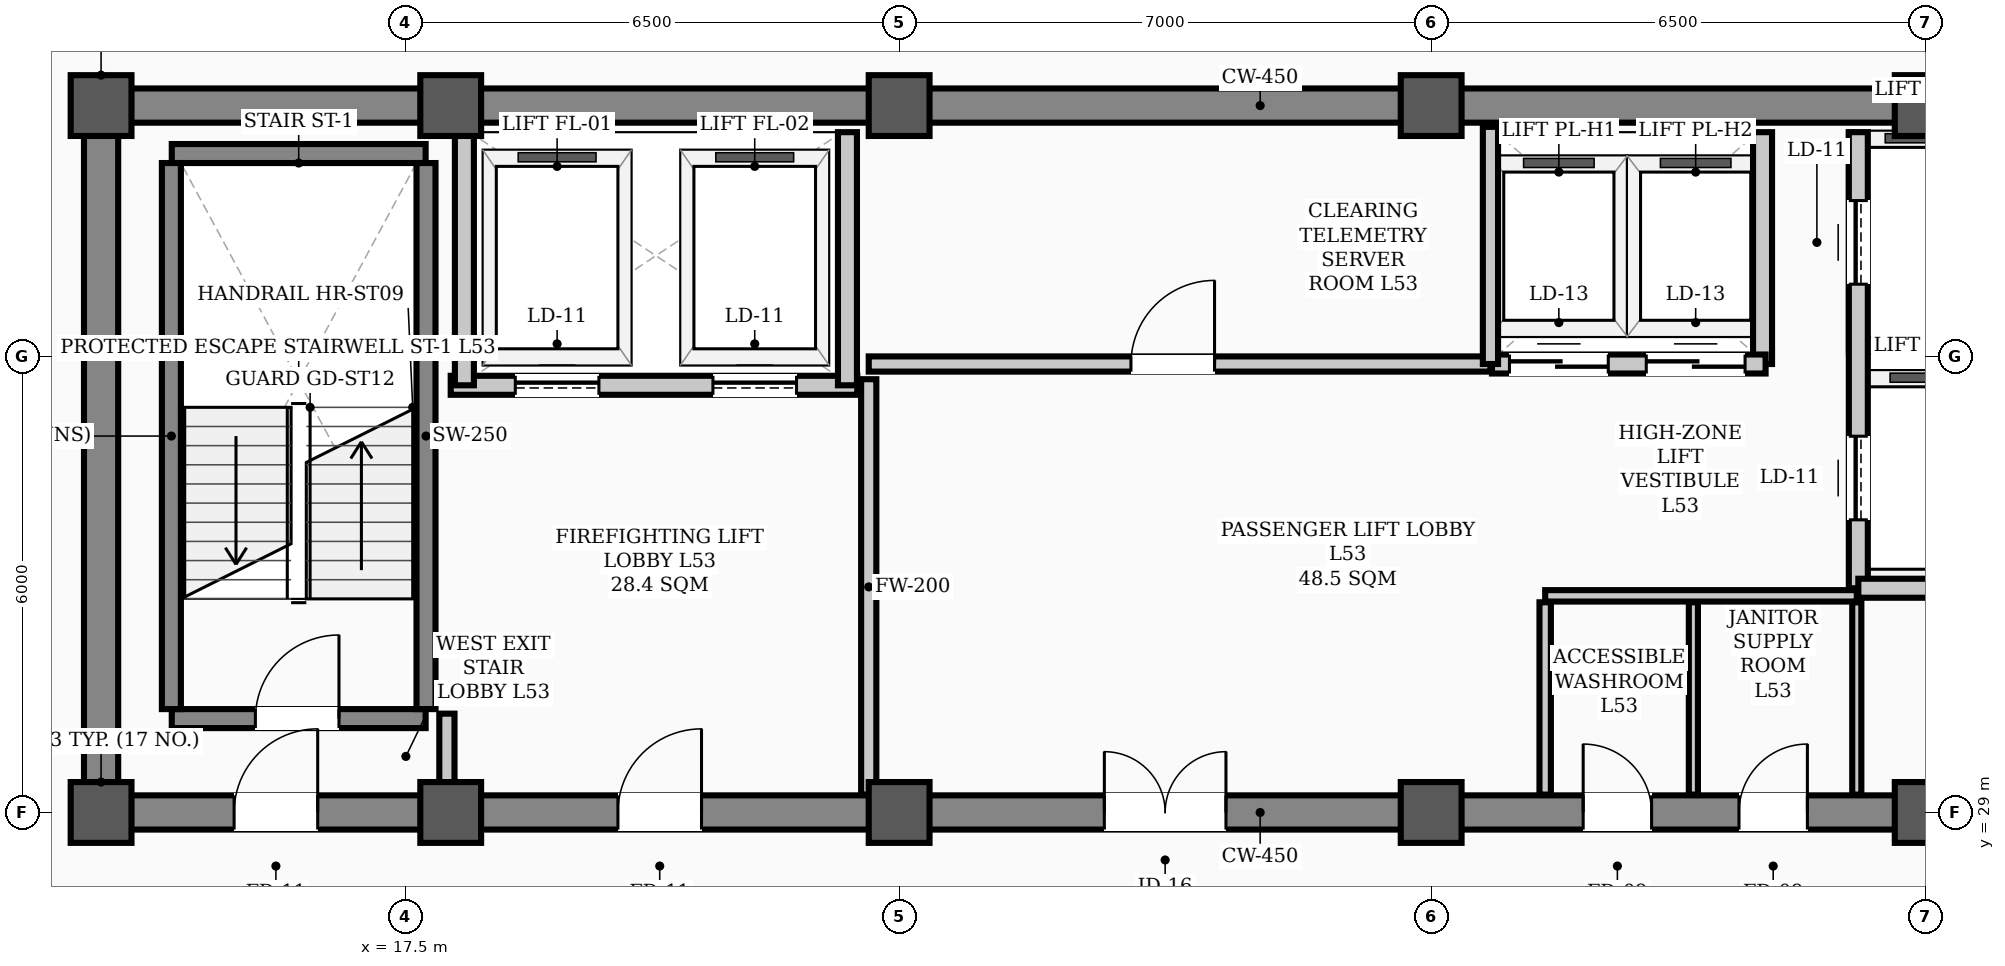
"""IFC4 building model, lengths in metres.
Left out: names, types, materials, properties, quantities, classifications, styles, units other than length and angle.
Written with IfcOpenShell. Run it as: python <this file> out.ifc"""

import sys

from ifc_helpers import new_model, si_unit, direction, frame, frame_2d, origin, origin_2d, place, context, subcontext, project, spatial, rectangle, hollow_rectangle, extrude, element, fill, save


model = new_model("IFC4")
c1 = context("Model", 3, precision=1e-05, world=origin(), true_north=direction((0.0, 1.0)))
c2 = subcontext(c1, "Body", "Model", "MODEL_VIEW")
j1 = project(units=[si_unit("LENGTHUNIT", "METRE"), si_unit("PLANEANGLEUNIT", "RADIAN")], contexts=[c1])
p1 = place(None, origin())
s1 = spatial("IfcSite", under=j1, at=p1, CompositionType="ELEMENT")
p2 = place(p1, origin())
s2 = spatial("IfcBuilding", under=s1, at=p2, CompositionType="ELEMENT")
p3 = place(p2, frame((0.0, 0.0, 215.0)))
s3 = spatial("IfcBuildingStorey", under=s2, at=p3, CompositionType="ELEMENT", Elevation=215.0)
for number, where, z_axis, x_axis in (
    (1, (13.5, 29.0, 0.0), (0.0, 0.0, 1.0), (1.0, 0.0, 0.0)),
    (2, (13.5, 38.3, 0.0), (0.0, 0.0, 1.0), (1.0, 0.0, 0.0)),
    (3, (18.1, 29.0, 0.0), (0.0, 0.0, 1.0), (1.0, 0.0, 0.0)),
    (4, (18.1, 38.3, 0.0), (0.0, 0.0, 1.0), (1.0, 0.0, 0.0)),
    (5, (24.0, 29.0, 0.0), (0.0, 0.0, 1.0), (1.0, 0.0, 0.0)),
    (6, (24.0, 38.3, 0.0), (0.0, 0.0, 1.0), (1.0, 0.0, 0.0)),
    (7, (31.0, 29.0, 0.0), (0.0, 0.0, 1.0), (1.0, 0.0, 0.0)),
    (8, (31.0, 38.3, 0.0), (0.0, 0.0, 1.0), (1.0, 0.0, 0.0)),
    (9, (37.5, 29.0, 0.0), (0.0, 0.0, 1.0), (1.0, 0.0, 0.0)),
    (10, (37.5, 38.3, 0.0), (0.0, 0.0, 1.0), (1.0, 0.0, 0.0)),
):
    element("IfcColumn", number, at=place(p3, frame(where, z_axis=z_axis, x_axis=x_axis)), inside=s3, PredefinedType="COLUMN", context=c2, shape_type="SweptSolid", body=[
        extrude(hollow_rectangle(XDim=0.8, YDim=0.8, WallThickness=0.032, InnerFilletRadius=0.016, OuterFilletRadius=0.048, at=origin_2d()), origin(), (0.0, 0.0, 1.0), 3.9),
    ])
p4 = place(p3, frame((13.5, 29.0, 0.0), z_axis=(0.0, 0.0, 1.0), x_axis=(1.0, 0.0, 0.0)))
e11 = element("IfcWall", 11, at=p4, inside=s3, PredefinedType="SHEAR", context=c2, shape_type="SweptSolid", body=[
    extrude(rectangle(XDim=30.5, YDim=0.45, at=frame_2d((15.25, 0.0))), origin(), (0.0, 0.0, 1.0), 3.72),
])
p5 = place(p4, frame((1.75, 0.0, 0.0)))
e12 = element("IfcOpeningElement", 12, at=p5, cuts=e11, PredefinedType="OPENING", context=c2, shape_type="SweptSolid", body=[
    extrude(rectangle(XDim=1.1, YDim=2.08, at=frame_2d((0.55, 1.04))), frame((0.0, 0.235, 0.0), z_axis=(0.0, -1.0, 0.0), x_axis=(1.0, 0.0, 0.0)), (0.0, 0.0, 1.0), 0.47),
])
p6 = place(p4, frame((26.7, 0.0, 0.0)))
e13 = element("IfcOpeningElement", 13, at=p6, cuts=e11, PredefinedType="OPENING", context=c2, shape_type="SweptSolid", body=[
    extrude(rectangle(XDim=1.1, YDim=2.08, at=frame_2d((0.55, 1.04))), frame((0.0, 0.235, 0.0), z_axis=(0.0, -1.0, 0.0), x_axis=(1.0, 0.0, 0.0)), (0.0, 0.0, 1.0), 0.47),
])
p7 = place(p4, frame((6.8, 0.0, 0.0)))
e14 = element("IfcOpeningElement", 14, at=p7, cuts=e11, PredefinedType="OPENING", context=c2, shape_type="SweptSolid", body=[
    extrude(rectangle(XDim=1.1, YDim=2.08, at=frame_2d((0.55, 1.04))), frame((0.0, 0.235, 0.0), z_axis=(0.0, -1.0, 0.0), x_axis=(1.0, 0.0, 0.0)), (0.0, 0.0, 1.0), 0.47),
])
p8 = place(p4, frame((13.2, 0.0, 0.0)))
e15 = element("IfcOpeningElement", 15, at=p8, cuts=e11, PredefinedType="OPENING", context=c2, shape_type="SweptSolid", body=[
    extrude(rectangle(XDim=1.6, YDim=2.08, at=frame_2d((0.8, 1.04))), frame((0.0, 0.235, 0.0), z_axis=(0.0, -1.0, 0.0), x_axis=(1.0, 0.0, 0.0)), (0.0, 0.0, 1.0), 0.47),
])
p9 = place(p4, frame((19.5, 0.0, 0.0)))
e16 = element("IfcOpeningElement", 16, at=p9, cuts=e11, PredefinedType="OPENING", context=c2, shape_type="SweptSolid", body=[
    extrude(rectangle(XDim=0.9, YDim=2.08, at=frame_2d((0.45, 1.04))), frame((0.0, 0.235, 0.0), z_axis=(0.0, -1.0, 0.0), x_axis=(1.0, 0.0, 0.0)), (0.0, 0.0, 1.0), 0.47),
])
p10 = place(p4, frame((21.55, 0.0, 0.0)))
e17 = element("IfcOpeningElement", 17, at=p10, cuts=e11, PredefinedType="OPENING", context=c2, shape_type="SweptSolid", body=[
    extrude(rectangle(XDim=0.9, YDim=2.08, at=frame_2d((0.45, 1.04))), frame((0.0, 0.235, 0.0), z_axis=(0.0, -1.0, 0.0), x_axis=(1.0, 0.0, 0.0)), (0.0, 0.0, 1.0), 0.47),
])
p11 = place(p3, frame((13.5, 38.3, 0.0), z_axis=(0.0, 0.0, 1.0), x_axis=(1.0, 0.0, 0.0)))
e18 = element("IfcWall", 18, at=p11, inside=s3, PredefinedType="SHEAR", context=c2, shape_type="SweptSolid", body=[
    extrude(rectangle(XDim=30.5, YDim=0.45, at=frame_2d((15.25, 0.0))), origin(), (0.0, 0.0, 1.0), 3.72),
])
p12 = place(p3, frame((13.5, 29.35, 0.0), z_axis=(0.0, 0.0, 1.0), x_axis=(0.0, 1.0, 0.0)))
e19 = element("IfcWall", 19, at=p12, inside=s3, PredefinedType="SHEAR", context=c2, shape_type="SweptSolid", body=[
    extrude(rectangle(XDim=8.6, YDim=0.45, at=frame_2d((4.3, 0.0))), origin(), (0.0, 0.0, 1.0), 3.72),
])
p13 = place(p3, frame((14.43, 30.235, 0.0), z_axis=(0.0, 0.0, 1.0), x_axis=(1.0, 0.0, 0.0)))
e20 = element("IfcWall", 20, at=p13, inside=s3, PredefinedType="STANDARD", context=c2, shape_type="SweptSolid", body=[
    extrude(rectangle(XDim=3.34, YDim=0.25, at=frame_2d((1.67, 0.0))), origin(), (0.0, 0.0, 1.0), 3.72),
])
p14 = place(p13, frame((1.1, 0.0, 0.0)))
e21 = element("IfcOpeningElement", 21, at=p14, cuts=e20, PredefinedType="OPENING", context=c2, shape_type="SweptSolid", body=[
    extrude(rectangle(XDim=1.1, YDim=2.08, at=frame_2d((0.55, 1.04))), frame((0.0, 0.135, 0.0), z_axis=(0.0, -1.0, 0.0), x_axis=(1.0, 0.0, 0.0)), (0.0, 0.0, 1.0), 0.27),
])
p15 = place(p3, frame((14.43, 37.669, 0.0), z_axis=(0.0, 0.0, 1.0), x_axis=(1.0, 0.0, 0.0)))
e22 = element("IfcWall", 22, at=p15, inside=s3, PredefinedType="STANDARD", context=c2, shape_type="SweptSolid", body=[
    extrude(rectangle(XDim=3.34, YDim=0.25, at=frame_2d((1.67, 0.0))), origin(), (0.0, 0.0, 1.0), 3.72),
])
for number, where, z_axis, x_axis in (
    (23, (14.425, 30.36, 0.0), (0.0, 0.0, 1.0), (0.0, 1.0, 0.0)),
    (24, (17.775, 30.36, 0.0), (0.0, 0.0, 1.0), (0.0, 1.0, 0.0)),
):
    element("IfcWall", number, at=place(p3, frame(where, z_axis=z_axis, x_axis=x_axis)), inside=s3, PredefinedType="STANDARD", context=c2, shape_type="SweptSolid", body=[
        extrude(rectangle(XDim=7.184, YDim=0.25, at=frame_2d((3.592, 0.0))), origin(), (0.0, 0.0, 1.0), 3.72),
    ])
p16 = place(p3, frame((18.1, 34.62, 0.0), z_axis=(0.0, 0.0, 1.0), x_axis=(1.0, 0.0, 0.0)))
e25 = element("IfcWall", 25, at=p16, inside=s3, PredefinedType="STANDARD", context=c2, shape_type="SweptSolid", body=[
    extrude(rectangle(XDim=5.35, YDim=0.25, at=frame_2d((2.675, 0.0))), origin(), (0.0, 0.0, 1.0), 3.72),
])
p17 = place(p16, frame((0.85, 0.0, 0.0)))
e26 = element("IfcOpeningElement", 26, at=p17, cuts=e25, PredefinedType="OPENING", context=c2, shape_type="SweptSolid", body=[
    extrude(rectangle(XDim=1.1, YDim=2.08, at=frame_2d((0.55, 1.04))), frame((0.0, 0.135, 0.0), z_axis=(0.0, -1.0, 0.0), x_axis=(1.0, 0.0, 0.0)), (0.0, 0.0, 1.0), 0.27),
])
p18 = place(p16, frame((3.45, 0.0, 0.0)))
e27 = element("IfcOpeningElement", 27, at=p18, cuts=e25, PredefinedType="OPENING", context=c2, shape_type="SweptSolid", body=[
    extrude(rectangle(XDim=1.1, YDim=2.08, at=frame_2d((0.55, 1.04))), frame((0.0, 0.135, 0.0), z_axis=(0.0, -1.0, 0.0), x_axis=(1.0, 0.0, 0.0)), (0.0, 0.0, 1.0), 0.27),
])
p19 = place(p3, frame((36.62, 31.95, 0.0), z_axis=(0.0, 0.0, 1.0), x_axis=(0.0, 1.0, 0.0)))
e28 = element("IfcWall", 28, at=p19, inside=s3, PredefinedType="STANDARD", context=c2, shape_type="SweptSolid", body=[
    extrude(rectangle(XDim=6.0, YDim=0.25, at=frame_2d((3.0, 0.0))), origin(), (0.0, 0.0, 1.0), 3.72),
])
p20 = place(p19, frame((0.9, 0.0, 0.0)))
e29 = element("IfcOpeningElement", 29, at=p20, cuts=e28, PredefinedType="OPENING", context=c2, shape_type="SweptSolid", body=[
    extrude(rectangle(XDim=1.1, YDim=2.08, at=frame_2d((0.55, 1.04))), frame((0.0, 0.135, 0.0), z_axis=(0.0, -1.0, 0.0), x_axis=(1.0, 0.0, 0.0)), (0.0, 0.0, 1.0), 0.27),
])
p21 = place(p19, frame((4.0, 0.0, 0.0)))
e30 = element("IfcOpeningElement", 30, at=p21, cuts=e28, PredefinedType="OPENING", context=c2, shape_type="SweptSolid", body=[
    extrude(rectangle(XDim=1.1, YDim=2.08, at=frame_2d((0.55, 1.04))), frame((0.0, 0.135, 0.0), z_axis=(0.0, -1.0, 0.0), x_axis=(1.0, 0.0, 0.0)), (0.0, 0.0, 1.0), 0.27),
])
p22 = place(p3, frame((36.62, 31.95, 0.0), z_axis=(0.0, 0.0, 1.0), x_axis=(1.0, 0.0, 0.0)))
e31 = element("IfcWall", 31, at=p22, inside=s3, PredefinedType="STANDARD", context=c2, shape_type="SweptSolid", body=[
    extrude(rectangle(XDim=1.9, YDim=0.25, at=frame_2d((0.95, 0.0))), origin(), (0.0, 0.0, 1.0), 3.48),
])
for number, where, z_axis, x_axis in (
    (32, (18.28, 34.62, 0.0), (0.0, 0.0, 1.0), (0.0, 1.0, 0.0)),
    (33, (23.32, 34.62, 0.0), (0.0, 0.0, 1.0), (0.0, 1.0, 0.0)),
):
    element("IfcWall", number, at=place(p3, frame(where, z_axis=z_axis, x_axis=x_axis)), inside=s3, PredefinedType="STANDARD", context=c2, shape_type="SweptSolid", body=[
        extrude(rectangle(XDim=3.33, YDim=0.25, at=frame_2d((1.665, 0.0))), origin(), (0.0, 0.0, 1.0), 3.72),
    ])
p23 = place(p3, frame((35.36, 34.9, 0.0), z_axis=(0.0, 0.0, 1.0), x_axis=(0.0, 1.0, 0.0)))
e34 = element("IfcWall", 34, at=p23, inside=s3, PredefinedType="STANDARD", context=c2, shape_type="SweptSolid", body=[
    extrude(rectangle(XDim=3.05, YDim=0.25, at=frame_2d((1.525, 0.0))), origin(), (0.0, 0.0, 1.0), 3.72),
])
p24 = place(p3, frame((31.8, 34.9, 0.0), z_axis=(0.0, 0.0, 1.0), x_axis=(1.0, 0.0, 0.0)))
e35 = element("IfcWall", 35, at=p24, inside=s3, PredefinedType="STANDARD", context=c2, shape_type="SweptSolid", body=[
    extrude(rectangle(XDim=3.6, YDim=0.25, at=frame_2d((1.8, 0.0))), origin(), (0.0, 0.0, 1.0), 3.72),
])
p25 = place(p24, frame((0.23, 0.0, 0.0)))
e36 = element("IfcOpeningElement", 36, at=p25, cuts=e35, PredefinedType="OPENING", context=c2, shape_type="SweptSolid", body=[
    extrude(rectangle(XDim=1.3, YDim=2.08, at=frame_2d((0.65, 1.04))), frame((0.0, 0.135, 0.0), z_axis=(0.0, -1.0, 0.0), x_axis=(1.0, 0.0, 0.0)), (0.0, 0.0, 1.0), 0.27),
])
p26 = place(p24, frame((2.03, 0.0, 0.0)))
e37 = element("IfcOpeningElement", 37, at=p26, cuts=e35, PredefinedType="OPENING", context=c2, shape_type="SweptSolid", body=[
    extrude(rectangle(XDim=1.3, YDim=2.08, at=frame_2d((0.65, 1.04))), frame((0.0, 0.135, 0.0), z_axis=(0.0, -1.0, 0.0), x_axis=(1.0, 0.0, 0.0)), (0.0, 0.0, 1.0), 0.27),
])
p27 = place(p3, frame((23.6, 34.9, 0.0), z_axis=(0.0, 0.0, 1.0), x_axis=(1.0, 0.0, 0.0)))
e38 = element("IfcWall", 38, at=p27, inside=s3, PredefinedType="STANDARD", context=c2, shape_type="SweptSolid", body=[
    extrude(rectangle(XDim=8.18, YDim=0.2, at=frame_2d((4.09, 0.0))), origin(), (0.0, 0.0, 1.0), 3.72),
])
p28 = place(p27, frame((3.45, 0.0, 0.0)))
e39 = element("IfcOpeningElement", 39, at=p28, cuts=e38, PredefinedType="OPENING", context=c2, shape_type="SweptSolid", body=[
    extrude(rectangle(XDim=1.1, YDim=2.08, at=frame_2d((0.55, 1.04))), frame((0.0, 0.11, 0.0), z_axis=(0.0, -1.0, 0.0), x_axis=(1.0, 0.0, 0.0)), (0.0, 0.0, 1.0), 0.22),
])
p29 = place(p3, frame((32.5, 31.85, 0.0), z_axis=(0.0, 0.0, 1.0), x_axis=(1.0, 0.0, 0.0)))
e40 = element("IfcWall", 40, at=p29, inside=s3, PredefinedType="PARTITIONING", context=c2, shape_type="SweptSolid", body=[
    extrude(rectangle(XDim=4.1, YDim=0.15, at=frame_2d((2.05, 0.0))), origin(), (0.0, 0.0, 1.0), 3.72),
])
p30 = place(p3, frame((18.05, 29.235, 0.0), z_axis=(0.0, 0.0, 1.0), x_axis=(0.0, 1.0, 0.0)))
e41 = element("IfcWall", 41, at=p30, inside=s3, PredefinedType="STANDARD", context=c2, shape_type="SweptSolid", body=[
    extrude(rectangle(XDim=1.065, YDim=0.2, at=frame_2d((0.532, 0.0))), origin(), (0.0, 0.0, 1.0), 3.35),
])
p31 = place(p3, frame((23.6, 29.235, 0.0), z_axis=(0.0, 0.0, 1.0), x_axis=(0.0, 1.0, 0.0)))
e42 = element("IfcWall", 42, at=p31, inside=s3, PredefinedType="STANDARD", context=c2, shape_type="SweptSolid", body=[
    extrude(rectangle(XDim=5.465, YDim=0.2, at=frame_2d((2.732, 0.0))), origin(), (0.0, 0.0, 1.0), 3.2),
])
p32 = place(p3, frame((32.5, 29.235, 0.0), z_axis=(0.0, 0.0, 1.0), x_axis=(0.0, 1.0, 0.0)))
e43 = element("IfcWall", 43, at=p32, inside=s3, PredefinedType="PARTITIONING", context=c2, shape_type="SweptSolid", body=[
    extrude(rectangle(XDim=2.53, YDim=0.15, at=frame_2d((1.265, 0.0))), origin(), (0.0, 0.0, 1.0), 3.35),
])
for number, where, z_axis, x_axis in (
    (44, (36.6, 29.235, 0.0), (0.0, 0.0, 1.0), (0.0, 1.0, 0.0)),
    (45, (34.45, 29.235, 0.0), (0.0, 0.0, 1.0), (0.0, 1.0, 0.0)),
):
    element("IfcWall", number, at=place(p3, frame(where, z_axis=z_axis, x_axis=x_axis)), inside=s3, PredefinedType="PARTITIONING", context=c2, shape_type="SweptSolid", body=[
        extrude(rectangle(XDim=2.53, YDim=0.12, at=frame_2d((1.265, 0.0))), origin(), (0.0, 0.0, 1.0), 3.35),
    ])
p33 = place(p3, frame((31.78, 34.9, 0.0), z_axis=(0.0, 0.0, 1.0), x_axis=(0.0, 1.0, 0.0)))
e46 = element("IfcWall", 46, at=p33, inside=s3, PredefinedType="STANDARD", context=c2, shape_type="SweptSolid", body=[
    extrude(rectangle(XDim=3.12, YDim=0.2, at=frame_2d((1.56, 0.0))), origin(), (0.0, 0.0, 1.0), 3.72),
])
p34 = place(p14, origin())
e47 = element("IfcDoor", 47, at=p34, inside=s3, OperationType="SINGLE_SWING_RIGHT", PredefinedType="DOOR", context=c2, shape_type="SweptSolid", body=[
    extrude(rectangle(XDim=1.1, YDim=2.08, at=frame_2d((0.55, 1.04))), frame((0.0, 0.025, 0.0), z_axis=(0.0, -1.0, 0.0), x_axis=(1.0, 0.0, 0.0)), (0.0, 0.0, 1.0), 0.05),
])
fill(e21, e47)
p35 = place(p5, origin())
e48 = element("IfcDoor", 48, at=p35, inside=s3, OperationType="SINGLE_SWING_RIGHT", PredefinedType="DOOR", context=c2, shape_type="SweptSolid", body=[
    extrude(rectangle(XDim=1.1, YDim=2.08, at=frame_2d((0.55, 1.04))), frame((0.0, 0.025, 0.0), z_axis=(0.0, -1.0, 0.0), x_axis=(1.0, 0.0, 0.0)), (0.0, 0.0, 1.0), 0.05),
])
fill(e12, e48)
p36 = place(p7, origin())
e49 = element("IfcDoor", 49, at=p36, inside=s3, OperationType="SINGLE_SWING_RIGHT", PredefinedType="DOOR", context=c2, shape_type="SweptSolid", body=[
    extrude(rectangle(XDim=1.1, YDim=2.08, at=frame_2d((0.55, 1.04))), frame((0.0, 0.025, 0.0), z_axis=(0.0, -1.0, 0.0), x_axis=(1.0, 0.0, 0.0)), (0.0, 0.0, 1.0), 0.05),
])
fill(e14, e49)
p37 = place(p8, origin())
e50 = element("IfcDoor", 50, at=p37, inside=s3, OperationType="DOUBLE_DOOR_SINGLE_SWING", PredefinedType="DOOR", context=c2, shape_type="SweptSolid", body=[
    extrude(rectangle(XDim=1.6, YDim=2.08, at=frame_2d((0.8, 1.04))), frame((0.0, 0.025, 0.0), z_axis=(0.0, -1.0, 0.0), x_axis=(1.0, 0.0, 0.0)), (0.0, 0.0, 1.0), 0.05),
])
fill(e15, e50)
p38 = place(p28, origin())
e51 = element("IfcDoor", 51, at=p38, inside=s3, OperationType="SINGLE_SWING_RIGHT", PredefinedType="DOOR", context=c2, shape_type="SweptSolid", body=[
    extrude(rectangle(XDim=1.1, YDim=2.08, at=frame_2d((0.55, 1.04))), frame((0.0, 0.025, 0.0), z_axis=(0.0, -1.0, 0.0), x_axis=(1.0, 0.0, 0.0)), (0.0, 0.0, 1.0), 0.05),
])
fill(e39, e51)
p39 = place(p9, origin())
e52 = element("IfcDoor", 52, at=p39, inside=s3, OperationType="SINGLE_SWING_LEFT", PredefinedType="DOOR", context=c2, shape_type="SweptSolid", body=[
    extrude(rectangle(XDim=0.9, YDim=2.08, at=frame_2d((0.45, 1.04))), frame((0.0, 0.025, 0.0), z_axis=(0.0, -1.0, 0.0), x_axis=(1.0, 0.0, 0.0)), (0.0, 0.0, 1.0), 0.05),
])
fill(e16, e52)
p40 = place(p10, origin())
e53 = element("IfcDoor", 53, at=p40, inside=s3, OperationType="SINGLE_SWING_RIGHT", PredefinedType="DOOR", context=c2, shape_type="SweptSolid", body=[
    extrude(rectangle(XDim=0.9, YDim=2.08, at=frame_2d((0.45, 1.04))), frame((0.0, 0.025, 0.0), z_axis=(0.0, -1.0, 0.0), x_axis=(1.0, 0.0, 0.0)), (0.0, 0.0, 1.0), 0.05),
])
fill(e17, e53)
p41 = place(p17, origin())
e54 = element("IfcDoor", 54, at=p41, inside=s3, OperationType="SLIDING_TO_LEFT", PredefinedType="DOOR", context=c2, shape_type="SweptSolid", body=[
    extrude(rectangle(XDim=1.1, YDim=2.08, at=frame_2d((0.55, 1.04))), frame((0.0, 0.025, 0.0), z_axis=(0.0, -1.0, 0.0), x_axis=(1.0, 0.0, 0.0)), (0.0, 0.0, 1.0), 0.05),
])
fill(e26, e54)
p42 = place(p18, origin())
e55 = element("IfcDoor", 55, at=p42, inside=s3, OperationType="SLIDING_TO_LEFT", PredefinedType="DOOR", context=c2, shape_type="SweptSolid", body=[
    extrude(rectangle(XDim=1.1, YDim=2.08, at=frame_2d((0.55, 1.04))), frame((0.0, 0.025, 0.0), z_axis=(0.0, -1.0, 0.0), x_axis=(1.0, 0.0, 0.0)), (0.0, 0.0, 1.0), 0.05),
])
fill(e27, e55)
p43 = place(p20, origin())
e56 = element("IfcDoor", 56, at=p43, inside=s3, OperationType="SLIDING_TO_LEFT", PredefinedType="DOOR", context=c2, shape_type="SweptSolid", body=[
    extrude(rectangle(XDim=1.1, YDim=2.08, at=frame_2d((0.55, 1.04))), frame((0.0, 0.025, 0.0), z_axis=(0.0, -1.0, 0.0), x_axis=(1.0, 0.0, 0.0)), (0.0, 0.0, 1.0), 0.05),
])
fill(e29, e56)
p44 = place(p21, origin())
e57 = element("IfcDoor", 57, at=p44, inside=s3, OperationType="SLIDING_TO_LEFT", PredefinedType="DOOR", context=c2, shape_type="SweptSolid", body=[
    extrude(rectangle(XDim=1.1, YDim=2.08, at=frame_2d((0.55, 1.04))), frame((0.0, 0.025, 0.0), z_axis=(0.0, -1.0, 0.0), x_axis=(1.0, 0.0, 0.0)), (0.0, 0.0, 1.0), 0.05),
])
fill(e30, e57)
p45 = place(p25, origin())
e58 = element("IfcDoor", 58, at=p45, inside=s3, OperationType="DOUBLE_DOOR_SLIDING", PredefinedType="DOOR", context=c2, shape_type="SweptSolid", body=[
    extrude(rectangle(XDim=1.3, YDim=2.08, at=frame_2d((0.65, 1.04))), frame((0.0, 0.025, 0.0), z_axis=(0.0, -1.0, 0.0), x_axis=(1.0, 0.0, 0.0)), (0.0, 0.0, 1.0), 0.05),
])
fill(e36, e58)
p46 = place(p26, origin())
e59 = element("IfcDoor", 59, at=p46, inside=s3, OperationType="DOUBLE_DOOR_SLIDING", PredefinedType="DOOR", context=c2, shape_type="SweptSolid", body=[
    extrude(rectangle(XDim=1.3, YDim=2.08, at=frame_2d((0.65, 1.04))), frame((0.0, 0.025, 0.0), z_axis=(0.0, -1.0, 0.0), x_axis=(1.0, 0.0, 0.0)), (0.0, 0.0, 1.0), 0.05),
])
fill(e37, e59)
save(model, sys.argv[1])
